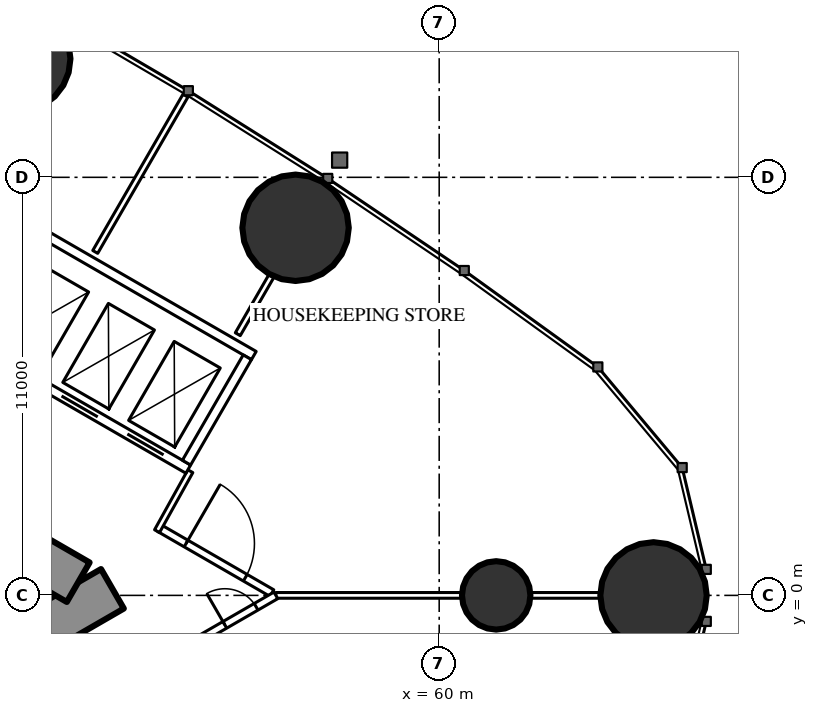
"""IFC4 building model, lengths in metres.
Left out: names, types, materials, properties, quantities, classifications, styles, units other than length and angle.
Written with IfcOpenShell. Run it as: python <this file> out.ifc"""

import sys

from ifc_helpers import new_model, si_unit, direction, frame, frame_2d, origin, origin_2d, place, context, subcontext, project, spatial, rectangle, circle, extrude, element, fill, save


model = new_model("IFC4")
c1 = context("Model", 3, precision=1e-05, world=origin(), true_north=direction((0.0, 1.0)))
c2 = subcontext(c1, "Body", "Model", "MODEL_VIEW")
j1 = project(units=[si_unit("LENGTHUNIT", "METRE"), si_unit("PLANEANGLEUNIT", "RADIAN")], contexts=[c1])
p1 = place(None, origin())
s1 = spatial("IfcSite", under=j1, at=p1, CompositionType="ELEMENT")
p2 = place(p1, origin())
s2 = spatial("IfcBuilding", under=s1, at=p2, CompositionType="ELEMENT")
p3 = place(p2, frame((0.0, 0.0, 184.3)))
s3 = spatial("IfcBuildingStorey", under=s2, at=p3, CompositionType="ELEMENT", Elevation=184.3)
for number, where, z_axis, x_axis in (
    (1, (65.64, 0.0, 0.0), (0.0, 0.0, 1.0), (1.0, 0.0, 0.0)),
    (2, (56.221, 9.672, 0.0), (0.0, 0.0, 1.0), (1.0, 0.0, 0.0)),
    (3, (48.897, 14.121, 0.0), (0.0, 0.0, 1.0), (1.0, 0.0, 0.0)),
):
    element("IfcColumn", number, at=place(p3, frame(where, z_axis=z_axis, x_axis=x_axis)), inside=s3, PredefinedType="COLUMN", context=c2, shape_type="SweptSolid", body=[
        extrude(circle(Radius=1.4, at=origin_2d()), origin(), (0.0, 0.0, 1.0), 3.5),
    ])
p4 = place(p3, frame((61.5, 0.0, 0.0), z_axis=(0.0, 0.0, 1.0), x_axis=(1.0, 0.0, 0.0)))
e4 = element("IfcColumn", 4, at=p4, inside=s3, PredefinedType="COLUMN", context=c2, shape_type="SweptSolid", body=[
    extrude(circle(Radius=0.9, at=origin_2d()), origin(), (0.0, 0.0, 1.0), 3.5),
])
p5 = place(p3, frame((27.2, -13.8, 0.0), z_axis=(0.0, 0.0, 1.0), x_axis=(0.866027159892, 0.499996958321, 0.0)))
e5 = element("IfcWall", 5, at=p5, inside=s3, PredefinedType="SHEAR", context=c2, shape_type="SweptSolid", body=[
    extrude(rectangle(XDim=27.947, YDim=1.2, at=frame_2d((13.973, 0.0))), origin(), (0.0, 0.0, 1.0), 3.5),
])
p6 = place(p5, frame((4.6, 0.0, 0.0)))
e6 = element("IfcOpeningElement", 6, at=p6, cuts=e5, PredefinedType="OPENING", context=c2, shape_type="SweptSolid", body=[
    extrude(rectangle(XDim=1.0, YDim=2.2, at=frame_2d((0.5, 1.1))), frame((0.0, 0.61, 0.0), z_axis=(0.0, -1.0, 0.0), x_axis=(1.0, 0.0, 0.0)), (0.0, 0.0, 1.0), 1.22),
])
p7 = place(p5, frame((13.395, 0.0, 0.0)))
e7 = element("IfcOpeningElement", 7, at=p7, cuts=e5, PredefinedType="OPENING", context=c2, shape_type="SweptSolid", body=[
    extrude(rectangle(XDim=1.8, YDim=2.2, at=frame_2d((0.9, 1.1))), frame((0.0, 0.61, 0.0), z_axis=(0.0, -1.0, 0.0), x_axis=(1.0, 0.0, 0.0)), (0.0, 0.0, 1.0), 1.22),
])
p8 = place(p3, frame((27.2, 13.8, 0.0), z_axis=(0.0, 0.0, 1.0), x_axis=(0.866024515034, -0.500001539357, 0.0)))
e8 = element("IfcWall", 8, at=p8, inside=s3, PredefinedType="SHEAR", context=c2, shape_type="SweptSolid", body=[
    extrude(rectangle(XDim=26.907, YDim=1.2, at=frame_2d((13.454, 0.0))), origin(), (0.0, 0.0, 1.0), 3.5),
])
p9 = place(p8, frame((4.6, 0.0, 0.0)))
e9 = element("IfcOpeningElement", 9, at=p9, cuts=e8, PredefinedType="OPENING", context=c2, shape_type="SweptSolid", body=[
    extrude(rectangle(XDim=1.0, YDim=2.2, at=frame_2d((0.5, 1.1))), frame((0.0, 0.61, 0.0), z_axis=(0.0, -1.0, 0.0), x_axis=(1.0, 0.0, 0.0)), (0.0, 0.0, 1.0), 1.22),
])
p10 = place(p8, frame((13.395, 0.0, 0.0)))
e10 = element("IfcOpeningElement", 10, at=p10, cuts=e8, PredefinedType="OPENING", context=c2, shape_type="SweptSolid", body=[
    extrude(rectangle(XDim=1.8, YDim=2.2, at=frame_2d((0.9, 1.1))), frame((0.0, 0.61, 0.0), z_axis=(0.0, -1.0, 0.0), x_axis=(1.0, 0.0, 0.0)), (0.0, 0.0, 1.0), 1.22),
])
p11 = place(p3, frame((55.702, 0.0, 0.0), z_axis=(0.0, 0.0, 1.0), x_axis=(1.0, 0.0, 0.0)))
e11 = element("IfcWall", 11, at=p11, inside=s3, PredefinedType="PARTITIONING", context=c2, shape_type="SweptSolid", body=[
    extrude(rectangle(XDim=8.518, YDim=0.15, at=frame_2d((4.259, 0.0))), origin(), (0.0, 0.0, 1.0), 2.3),
])
p12 = place(p3, frame((50.95, 9.037, 0.0), z_axis=(0.0, 0.0, 1.0), x_axis=(0.499988022762, 0.866032318735, 0.0)))
e12 = element("IfcWall", 12, at=p12, inside=s3, PredefinedType="PARTITIONING", context=c2, shape_type="SweptSolid", body=[
    extrude(rectangle(XDim=4.748, YDim=0.15, at=frame_2d((2.374, 0.0))), origin(), (0.0, 0.0, 1.0), 3.25),
])
p13 = place(p3, frame((54.7, 6.872, 0.0), z_axis=(0.0, 0.0, 1.0), x_axis=(0.499989690894, 0.866031355668, 0.0)))
e13 = element("IfcWall", 13, at=p13, inside=s3, PredefinedType="PARTITIONING", context=c2, shape_type="SweptSolid", body=[
    extrude(rectangle(XDim=1.766, YDim=0.15, at=frame_2d((0.883, 0.0))), origin(), (0.0, 0.0, 1.0), 3.25),
])
p14 = place(p3, frame((52.639, 1.769, 0.0), z_axis=(0.0, 0.0, 1.0), x_axis=(0.866027340901, -0.4999966448, 0.0)))
e14 = element("IfcWall", 14, at=p14, inside=s3, PredefinedType="PARTITIONING", context=c2, shape_type="SweptSolid", body=[
    extrude(rectangle(XDim=3.417, YDim=0.2, at=frame_2d((1.708, 0.0))), origin(), (0.0, 0.0, 1.0), 3.25),
])
p15 = place(p14, frame((0.809, 0.0, 0.0)))
e15 = element("IfcOpeningElement", 15, at=p15, cuts=e14, PredefinedType="OPENING", context=c2, shape_type="SweptSolid", body=[
    extrude(rectangle(XDim=1.8, YDim=2.2, at=frame_2d((0.9, 1.1))), frame((0.0, 0.11, 0.0), z_axis=(0.0, -1.0, 0.0), x_axis=(1.0, 0.0, 0.0)), (0.0, 0.0, 1.0), 0.22),
])
p16 = place(p3, frame((52.576, 1.689, 0.0), z_axis=(0.0, 0.0, 1.0), x_axis=(0.485482130951, 0.874246590229, 0.0)))
e16 = element("IfcWall", 16, at=p16, inside=s3, PredefinedType="PARTITIONING", context=c2, shape_type="SweptSolid", body=[
    extrude(rectangle(XDim=1.805, YDim=0.15, at=frame_2d((0.902, 0.0))), origin(), (0.0, 0.0, 1.0), 3.25),
])
p17 = place(p3, frame((51.997, -2.139, 0.0), z_axis=(0.0, 0.0, 1.0), x_axis=(0.866036399848, 0.499980953776, 0.0)))
e17 = element("IfcWall", 17, at=p17, inside=s3, PredefinedType="PARTITIONING", context=c2, shape_type="SweptSolid", body=[
    extrude(rectangle(XDim=4.279, YDim=0.2, at=frame_2d((2.139, 0.0))), origin(), (0.0, 0.0, 1.0), 3.25),
])
p18 = place(p17, frame((2.729, 0.0, 0.0)))
e18 = element("IfcOpeningElement", 18, at=p18, cuts=e17, PredefinedType="OPENING", context=c2, shape_type="SweptSolid", body=[
    extrude(rectangle(XDim=0.95, YDim=2.2, at=frame_2d((0.475, 1.1))), frame((0.0, 0.11, 0.0), z_axis=(0.0, -1.0, 0.0), x_axis=(1.0, 0.0, 0.0)), (0.0, 0.0, 1.0), 0.22),
])
p19 = place(p3, frame((47.681, 6.622, 0.0), z_axis=(0.0, 0.0, 1.0), x_axis=(0.86603344179, -0.499986077507, 0.0)))
e19 = element("IfcWall", 19, at=p19, inside=s3, PredefinedType="PARTITIONING", context=c2, shape_type="SweptSolid", body=[
    extrude(rectangle(XDim=6.6, YDim=0.25, at=frame_2d((3.3, 0.0))), origin(), (0.0, 0.0, 1.0), 3.25),
])
p20 = place(p19, frame((0.75, 0.0, 0.0)))
e20 = element("IfcOpeningElement", 20, at=p20, cuts=e19, PredefinedType="OPENING", context=c2, shape_type="SweptSolid", body=[
    extrude(rectangle(XDim=1.1, YDim=2.2, at=frame_2d((0.55, 1.1))), frame((0.0, 0.135, 0.0), z_axis=(0.0, -1.0, 0.0), x_axis=(1.0, 0.0, 0.0)), (0.0, 0.0, 1.0), 0.27),
])
p21 = place(p19, frame((2.75, 0.0, 0.0)))
e21 = element("IfcOpeningElement", 21, at=p21, cuts=e19, PredefinedType="OPENING", context=c2, shape_type="SweptSolid", body=[
    extrude(rectangle(XDim=1.1, YDim=2.2, at=frame_2d((0.55, 1.1))), frame((0.0, 0.135, 0.0), z_axis=(0.0, -1.0, 0.0), x_axis=(1.0, 0.0, 0.0)), (0.0, 0.0, 1.0), 0.27),
])
p22 = place(p19, frame((4.75, 0.0, 0.0)))
e22 = element("IfcOpeningElement", 22, at=p22, cuts=e19, PredefinedType="OPENING", context=c2, shape_type="SweptSolid", body=[
    extrude(rectangle(XDim=1.1, YDim=2.2, at=frame_2d((0.55, 1.1))), frame((0.0, 0.135, 0.0), z_axis=(0.0, -1.0, 0.0), x_axis=(1.0, 0.0, 0.0)), (0.0, 0.0, 1.0), 0.27),
])
p23 = place(p3, frame((49.406, 9.611, 0.0), z_axis=(0.0, 0.0, 1.0), x_axis=(0.86603344179, -0.499986077507, 0.0)))
e23 = element("IfcWall", 23, at=p23, inside=s3, PredefinedType="PARTITIONING", context=c2, shape_type="SweptSolid", body=[
    extrude(rectangle(XDim=6.6, YDim=0.25, at=frame_2d((3.3, 0.0))), origin(), (0.0, 0.0, 1.0), 3.25),
])
p24 = place(p3, frame((53.352, 3.493, 0.0), z_axis=(0.0, 0.0, 1.0), x_axis=(0.499872130319, 0.866099216793, 0.0)))
e24 = element("IfcWall", 24, at=p24, inside=s3, PredefinedType="PARTITIONING", context=c2, shape_type="SweptSolid", body=[
    extrude(rectangle(XDim=3.2, YDim=0.25, at=frame_2d((1.6, 0.0))), origin(), (0.0, 0.0, 1.0), 3.25),
])
p25 = place(p18, origin())
e25 = element("IfcDoor", 25, at=p25, inside=s3, OperationType="SINGLE_SWING_LEFT", PredefinedType="DOOR", context=c2, shape_type="SweptSolid", body=[
    extrude(rectangle(XDim=0.95, YDim=2.2, at=frame_2d((0.475, 1.1))), frame((0.0, 0.025, 0.0), z_axis=(0.0, -1.0, 0.0), x_axis=(1.0, 0.0, 0.0)), (0.0, 0.0, 1.0), 0.05),
])
fill(e18, e25)
p26 = place(p15, origin())
e26 = element("IfcDoor", 26, at=p26, inside=s3, OperationType="DOUBLE_DOOR_SINGLE_SWING", PredefinedType="DOOR", context=c2, shape_type="SweptSolid", body=[
    extrude(rectangle(XDim=1.8, YDim=2.2, at=frame_2d((0.9, 1.1))), frame((0.0, 0.025, 0.0), z_axis=(0.0, -1.0, 0.0), x_axis=(1.0, 0.0, 0.0)), (0.0, 0.0, 1.0), 0.05),
])
fill(e15, e26)
p27 = place(p21, origin())
e27 = element("IfcDoor", 27, at=p27, inside=s3, OperationType="DOUBLE_DOOR_SLIDING", PredefinedType="USERDEFINED", context=c2, shape_type="SweptSolid", body=[
    extrude(rectangle(XDim=1.1, YDim=2.2, at=frame_2d((0.55, 1.1))), frame((0.0, 0.025, 0.0), z_axis=(0.0, -1.0, 0.0), x_axis=(1.0, 0.0, 0.0)), (0.0, 0.0, 1.0), 0.05),
])
fill(e21, e27)
p28 = place(p22, origin())
e28 = element("IfcDoor", 28, at=p28, inside=s3, OperationType="DOUBLE_DOOR_SLIDING", PredefinedType="USERDEFINED", context=c2, shape_type="SweptSolid", body=[
    extrude(rectangle(XDim=1.1, YDim=2.2, at=frame_2d((0.55, 1.1))), frame((0.0, 0.025, 0.0), z_axis=(0.0, -1.0, 0.0), x_axis=(1.0, 0.0, 0.0)), (0.0, 0.0, 1.0), 0.05),
])
fill(e22, e28)
save(model, sys.argv[1])
